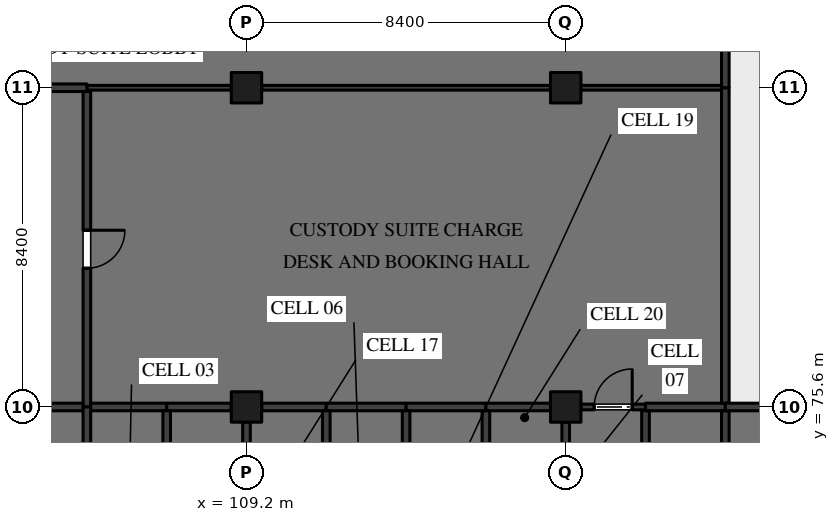
"""IFC4 building model, lengths in metres.
Left out: names, types, materials, properties, quantities, classifications, styles, units other than length and angle.
Written with IfcOpenShell. Run it as: python <this file> out.ifc"""

import sys

from ifc_helpers import new_model, si_unit, direction, frame, frame_2d, origin, origin_2d, place, context, subcontext, project, spatial, rectangle, extrude, element, fill, save


model = new_model("IFC4")
c1 = context("Model", 3, precision=1e-05, world=origin(), true_north=direction((0.0, 1.0)))
c2 = subcontext(c1, "Body", "Model", "MODEL_VIEW")
j1 = project(units=[si_unit("LENGTHUNIT", "METRE"), si_unit("PLANEANGLEUNIT", "RADIAN")], contexts=[c1])
p1 = place(None, origin())
s1 = spatial("IfcSite", under=j1, at=p1, CompositionType="ELEMENT")
p2 = place(p1, origin())
s2 = spatial("IfcBuilding", under=s1, at=p2, CompositionType="ELEMENT")
p3 = place(p2, origin())
s3 = spatial("IfcBuildingStorey", under=s2, at=p3, CompositionType="ELEMENT", Elevation=0.0)
for number, where, z_axis, x_axis in (
    (1, (109.2, 75.6, 0.0), (0.0, 0.0, 1.0), (1.0, 0.0, 0.0)),
    (2, (109.2, 84.0, 0.0), (0.0, 0.0, 1.0), (1.0, 0.0, 0.0)),
    (3, (117.6, 75.6, 0.0), (0.0, 0.0, 1.0), (1.0, 0.0, 0.0)),
    (4, (117.6, 84.0, 0.0), (0.0, 0.0, 1.0), (1.0, 0.0, 0.0)),
):
    element("IfcColumn", number, at=place(p3, frame(where, z_axis=z_axis, x_axis=x_axis)), inside=s3, PredefinedType="COLUMN", context=c2, shape_type="SweptSolid", body=[
        extrude(rectangle(XDim=0.8, YDim=0.8, at=origin_2d()), origin(), (0.0, 0.0, 1.0), 5.05),
    ])
p4 = place(p3, frame((118.0, 75.6, 0.0), z_axis=(0.0, 0.0, 1.0), x_axis=(1.0, 0.0, 0.0)))
e5 = element("IfcWall", 5, at=p4, inside=s3, PredefinedType="PARTITIONING", context=c2, shape_type="SweptSolid", body=[
    extrude(rectangle(XDim=1.7, YDim=0.15, at=frame_2d((0.85, 0.0))), origin(), (0.0, 0.0, 1.0), 5.05),
])
p5 = place(p4, frame((0.35, 0.0, 0.0)))
e6 = element("IfcOpeningElement", 6, at=p5, cuts=e5, PredefinedType="OPENING", context=c2, shape_type="SweptSolid", body=[
    extrude(rectangle(XDim=1.0, YDim=2.4, at=frame_2d((0.5, 1.2))), frame((0.0, 0.085, 0.0), z_axis=(0.0, -1.0, 0.0), x_axis=(1.0, 0.0, 0.0)), (0.0, 0.0, 1.0), 0.17),
])
p6 = place(p3, frame((105.0, 75.6, 0.0), z_axis=(0.0, 0.0, 1.0), x_axis=(0.0, 1.0, 0.0)))
e7 = element("IfcWall", 7, at=p6, inside=s3, PredefinedType="PARTITIONING", context=c2, shape_type="SweptSolid", body=[
    extrude(rectangle(XDim=8.3, YDim=0.2, at=frame_2d((4.15, 0.0))), origin(), (0.0, 0.0, 1.0), 5.05),
])
p7 = place(p6, frame((3.65, 0.0, 0.0)))
e8 = element("IfcOpeningElement", 8, at=p7, cuts=e7, PredefinedType="OPENING", context=c2, shape_type="SweptSolid", body=[
    extrude(rectangle(XDim=1.0, YDim=2.4, at=frame_2d((0.5, 1.2))), frame((0.0, 0.11, 0.0), z_axis=(0.0, -1.0, 0.0), x_axis=(1.0, 0.0, 0.0)), (0.0, 0.0, 1.0), 0.22),
])
p8 = place(p3, frame((105.1, 75.6, 0.0), z_axis=(0.0, 0.0, 1.0), x_axis=(1.0, 0.0, 0.0)))
e9 = element("IfcWall", 9, at=p8, inside=s3, PredefinedType="PARTITIONING", context=c2, shape_type="SweptSolid", body=[
    extrude(rectangle(XDim=2.0, YDim=0.2, at=frame_2d((1.0, 0.0))), origin(), (0.0, 0.0, 1.0), 5.05),
])
for number, where, z_axis, x_axis in (
    (10, (107.1, 75.6, 0.0), (0.0, 0.0, 1.0), (1.0, 0.0, 0.0)),
    (11, (109.6, 75.6, 0.0), (0.0, 0.0, 1.0), (1.0, 0.0, 0.0)),
):
    element("IfcWall", number, at=place(p3, frame(where, z_axis=z_axis, x_axis=x_axis)), inside=s3, PredefinedType="PARTITIONING", context=c2, shape_type="SweptSolid", body=[
        extrude(rectangle(XDim=1.7, YDim=0.2, at=frame_2d((0.85, 0.0))), origin(), (0.0, 0.0, 1.0), 5.05),
    ])
p9 = place(p3, frame((111.3, 75.6, 0.0), z_axis=(0.0, 0.0, 1.0), x_axis=(1.0, 0.0, 0.0)))
e12 = element("IfcWall", 12, at=p9, inside=s3, PredefinedType="PARTITIONING", context=c2, shape_type="SweptSolid", body=[
    extrude(rectangle(XDim=2.1, YDim=0.2, at=frame_2d((1.05, 0.0))), origin(), (0.0, 0.0, 1.0), 5.05),
])
p10 = place(p3, frame((113.4, 75.6, 0.0), z_axis=(0.0, 0.0, 1.0), x_axis=(1.0, 0.0, 0.0)))
e13 = element("IfcWall", 13, at=p10, inside=s3, PredefinedType="PARTITIONING", context=c2, shape_type="SweptSolid", body=[
    extrude(rectangle(XDim=2.1, YDim=0.2, at=frame_2d((1.05, 0.0))), origin(), (0.0, 0.0, 1.0), 5.05),
])
p11 = place(p3, frame((115.5, 75.6, 0.0), z_axis=(0.0, 0.0, 1.0), x_axis=(1.0, 0.0, 0.0)))
e14 = element("IfcWall", 14, at=p11, inside=s3, PredefinedType="PARTITIONING", context=c2, shape_type="SweptSolid", body=[
    extrude(rectangle(XDim=1.7, YDim=0.2, at=frame_2d((0.85, 0.0))), origin(), (0.0, 0.0, 1.0), 5.05),
])
p12 = place(p3, frame((119.7, 75.6, 0.0), z_axis=(0.0, 0.0, 1.0), x_axis=(1.0, 0.0, 0.0)))
e15 = element("IfcWall", 15, at=p12, inside=s3, PredefinedType="PARTITIONING", context=c2, shape_type="SweptSolid", body=[
    extrude(rectangle(XDim=2.1, YDim=0.2, at=frame_2d((1.05, 0.0))), origin(), (0.0, 0.0, 1.0), 5.05),
])
p13 = place(p3, frame((105.0, 84.0, 0.0), z_axis=(0.0, 0.0, 1.0), x_axis=(1.0, 0.0, 0.0)))
e16 = element("IfcWall", 16, at=p13, inside=s3, PredefinedType="PARTITIONING", context=c2, shape_type="SweptSolid", body=[
    extrude(rectangle(XDim=3.8, YDim=0.125, at=frame_2d((1.9, 0.0))), origin(), (0.0, 0.0, 1.0), 5.05),
])
p14 = place(p3, frame((109.6, 84.0, 0.0), z_axis=(0.0, 0.0, 1.0), x_axis=(1.0, 0.0, 0.0)))
e17 = element("IfcWall", 17, at=p14, inside=s3, PredefinedType="PARTITIONING", context=c2, shape_type="SweptSolid", body=[
    extrude(rectangle(XDim=7.6, YDim=0.125, at=frame_2d((3.8, 0.0))), origin(), (0.0, 0.0, 1.0), 5.05),
])
p15 = place(p3, frame((118.0, 84.0, 0.0), z_axis=(0.0, 0.0, 1.0), x_axis=(1.0, 0.0, 0.0)))
e18 = element("IfcWall", 18, at=p15, inside=s3, PredefinedType="PARTITIONING", context=c2, shape_type="SweptSolid", body=[
    extrude(rectangle(XDim=3.7, YDim=0.125, at=frame_2d((1.85, 0.0))), origin(), (0.0, 0.0, 1.0), 5.05),
])
p16 = place(p3, frame((121.8, 75.7, 0.0), z_axis=(0.0, 0.0, 1.0), x_axis=(0.0, 1.0, 0.0)))
e19 = element("IfcWall", 19, at=p16, inside=s3, PredefinedType="PARTITIONING", context=c2, shape_type="SweptSolid", body=[
    extrude(rectangle(XDim=8.3, YDim=0.2, at=frame_2d((4.15, 0.0))), origin(), (0.0, 0.0, 1.0), 5.05),
])
p17 = place(p3, frame((117.6, 72.4, 0.0), z_axis=(0.0, 0.0, 1.0), x_axis=(0.0, 1.0, 0.0)))
e20 = element("IfcWall", 20, at=p17, inside=s3, PredefinedType="PARTITIONING", context=c2, shape_type="SweptSolid", body=[
    extrude(rectangle(XDim=2.8, YDim=0.2, at=frame_2d((1.4, 0.0))), origin(), (0.0, 0.0, 1.0), 5.05),
])
p18 = place(p3, frame((119.7, 72.2, 0.0), z_axis=(0.0, 0.0, 1.0), x_axis=(0.0, 1.0, 0.0)))
e21 = element("IfcWall", 21, at=p18, inside=s3, PredefinedType="PARTITIONING", context=c2, shape_type="SweptSolid", body=[
    extrude(rectangle(XDim=3.3, YDim=0.2, at=frame_2d((1.65, 0.0))), origin(), (0.0, 0.0, 1.0), 5.05),
])
p19 = place(p3, frame((102.9, 75.6, 0.0), z_axis=(0.0, 0.0, 1.0), x_axis=(1.0, 0.0, 0.0)))
e22 = element("IfcWall", 22, at=p19, inside=s3, PredefinedType="PARTITIONING", context=c2, shape_type="SweptSolid", body=[
    extrude(rectangle(XDim=2.0, YDim=0.2, at=frame_2d((1.0, 0.0))), origin(), (0.0, 0.0, 1.0), 5.05),
])
p20 = place(p3, frame((101.0, 84.0, 0.0), z_axis=(0.0, 0.0, 1.0), x_axis=(1.0, 0.0, 0.0)))
e23 = element("IfcWall", 23, at=p20, inside=s3, PredefinedType="PARTITIONING", context=c2, shape_type="SweptSolid", body=[
    extrude(rectangle(XDim=4.0, YDim=0.2, at=frame_2d((2.0, 0.0))), origin(), (0.0, 0.0, 1.0), 5.05),
])
p21 = place(p20, frame((1.1, 0.0, 0.0)))
e24 = element("IfcOpeningElement", 24, at=p21, cuts=e23, PredefinedType="OPENING", context=c2, shape_type="SweptSolid", body=[
    extrude(rectangle(XDim=1.8, YDim=2.1, at=frame_2d((0.9, 1.05))), frame((0.0, 0.11, 0.0), z_axis=(0.0, -1.0, 0.0), x_axis=(1.0, 0.0, 0.0)), (0.0, 0.0, 1.0), 0.22),
])
p22 = place(p3, frame((105.0, 72.4, 0.0), z_axis=(0.0, 0.0, 1.0), x_axis=(0.0, 1.0, 0.0)))
e25 = element("IfcWall", 25, at=p22, inside=s3, PredefinedType="PARTITIONING", context=c2, shape_type="SweptSolid", body=[
    extrude(rectangle(XDim=3.2, YDim=0.2, at=frame_2d((1.6, 0.0))), origin(), (0.0, 0.0, 1.0), 5.05),
])
p23 = place(p3, frame((107.1, 72.4, 0.0), z_axis=(0.0, 0.0, 1.0), x_axis=(0.0, 1.0, 0.0)))
e26 = element("IfcWall", 26, at=p23, inside=s3, PredefinedType="PARTITIONING", context=c2, shape_type="SweptSolid", body=[
    extrude(rectangle(XDim=3.1, YDim=0.2, at=frame_2d((1.55, 0.0))), origin(), (0.0, 0.0, 1.0), 5.05),
])
p24 = place(p3, frame((109.2, 72.4, 0.0), z_axis=(0.0, 0.0, 1.0), x_axis=(0.0, 1.0, 0.0)))
e27 = element("IfcWall", 27, at=p24, inside=s3, PredefinedType="PARTITIONING", context=c2, shape_type="SweptSolid", body=[
    extrude(rectangle(XDim=2.8, YDim=0.2, at=frame_2d((1.4, 0.0))), origin(), (0.0, 0.0, 1.0), 5.05),
])
for number, where, z_axis, x_axis in (
    (28, (111.3, 72.4, 0.0), (0.0, 0.0, 1.0), (0.0, 1.0, 0.0)),
    (29, (113.4, 72.4, 0.0), (0.0, 0.0, 1.0), (0.0, 1.0, 0.0)),
    (30, (115.5, 72.4, 0.0), (0.0, 0.0, 1.0), (0.0, 1.0, 0.0)),
    (31, (121.8, 72.4, 0.0), (0.0, 0.0, 1.0), (0.0, 1.0, 0.0)),
):
    element("IfcWall", number, at=place(p3, frame(where, z_axis=z_axis, x_axis=x_axis)), inside=s3, PredefinedType="PARTITIONING", context=c2, shape_type="SweptSolid", body=[
        extrude(rectangle(XDim=3.1, YDim=0.2, at=frame_2d((1.55, 0.0))), origin(), (0.0, 0.0, 1.0), 5.05),
    ])
p25 = place(p3, frame((121.8, 75.6, 0.0), z_axis=(0.0, 0.0, 1.0), x_axis=(1.0, 0.0, 0.0)))
e32 = element("IfcWall", 32, at=p25, inside=s3, PredefinedType="PARTITIONING", context=c2, shape_type="SweptSolid", body=[
    extrude(rectangle(XDim=2.1, YDim=0.2, at=frame_2d((1.05, 0.0))), origin(), (0.0, 0.0, 1.0), 5.05),
])
p26 = place(p3, frame((121.8, 84.0, 0.0), z_axis=(0.0, 0.0, 1.0), x_axis=(0.0, 1.0, 0.0)))
e33 = element("IfcWall", 33, at=p26, inside=s3, PredefinedType="PARTITIONING", context=c2, shape_type="SweptSolid", body=[
    extrude(rectangle(XDim=8.25, YDim=0.2, at=frame_2d((4.125, 0.0))), origin(), (0.0, 0.0, 1.0), 5.05),
])
p27 = place(p5, origin())
e34 = element("IfcDoor", 34, at=p27, inside=s3, OperationType="SINGLE_SWING_LEFT", PredefinedType="DOOR", context=c2, shape_type="SweptSolid", body=[
    extrude(rectangle(XDim=1.0, YDim=2.4, at=frame_2d((0.5, 1.2))), frame((0.0, 0.025, 0.0), z_axis=(0.0, -1.0, 0.0), x_axis=(1.0, 0.0, 0.0)), (0.0, 0.0, 1.0), 0.05),
])
fill(e6, e34)
p28 = place(p7, frame((1.0, 0.0, 0.0), z_axis=(0.0, 0.0, 1.0), x_axis=(-1.0, 0.0, 0.0)))
e35 = element("IfcDoor", 35, at=p28, inside=s3, OperationType="SINGLE_SWING_RIGHT", PredefinedType="DOOR", context=c2, shape_type="SweptSolid", body=[
    extrude(rectangle(XDim=1.0, YDim=2.4, at=frame_2d((0.5, 1.2))), frame((0.0, 0.035, 0.0), z_axis=(0.0, -1.0, 0.0), x_axis=(1.0, 0.0, 0.0)), (0.0, 0.0, 1.0), 0.07),
])
fill(e8, e35)
save(model, sys.argv[1])
